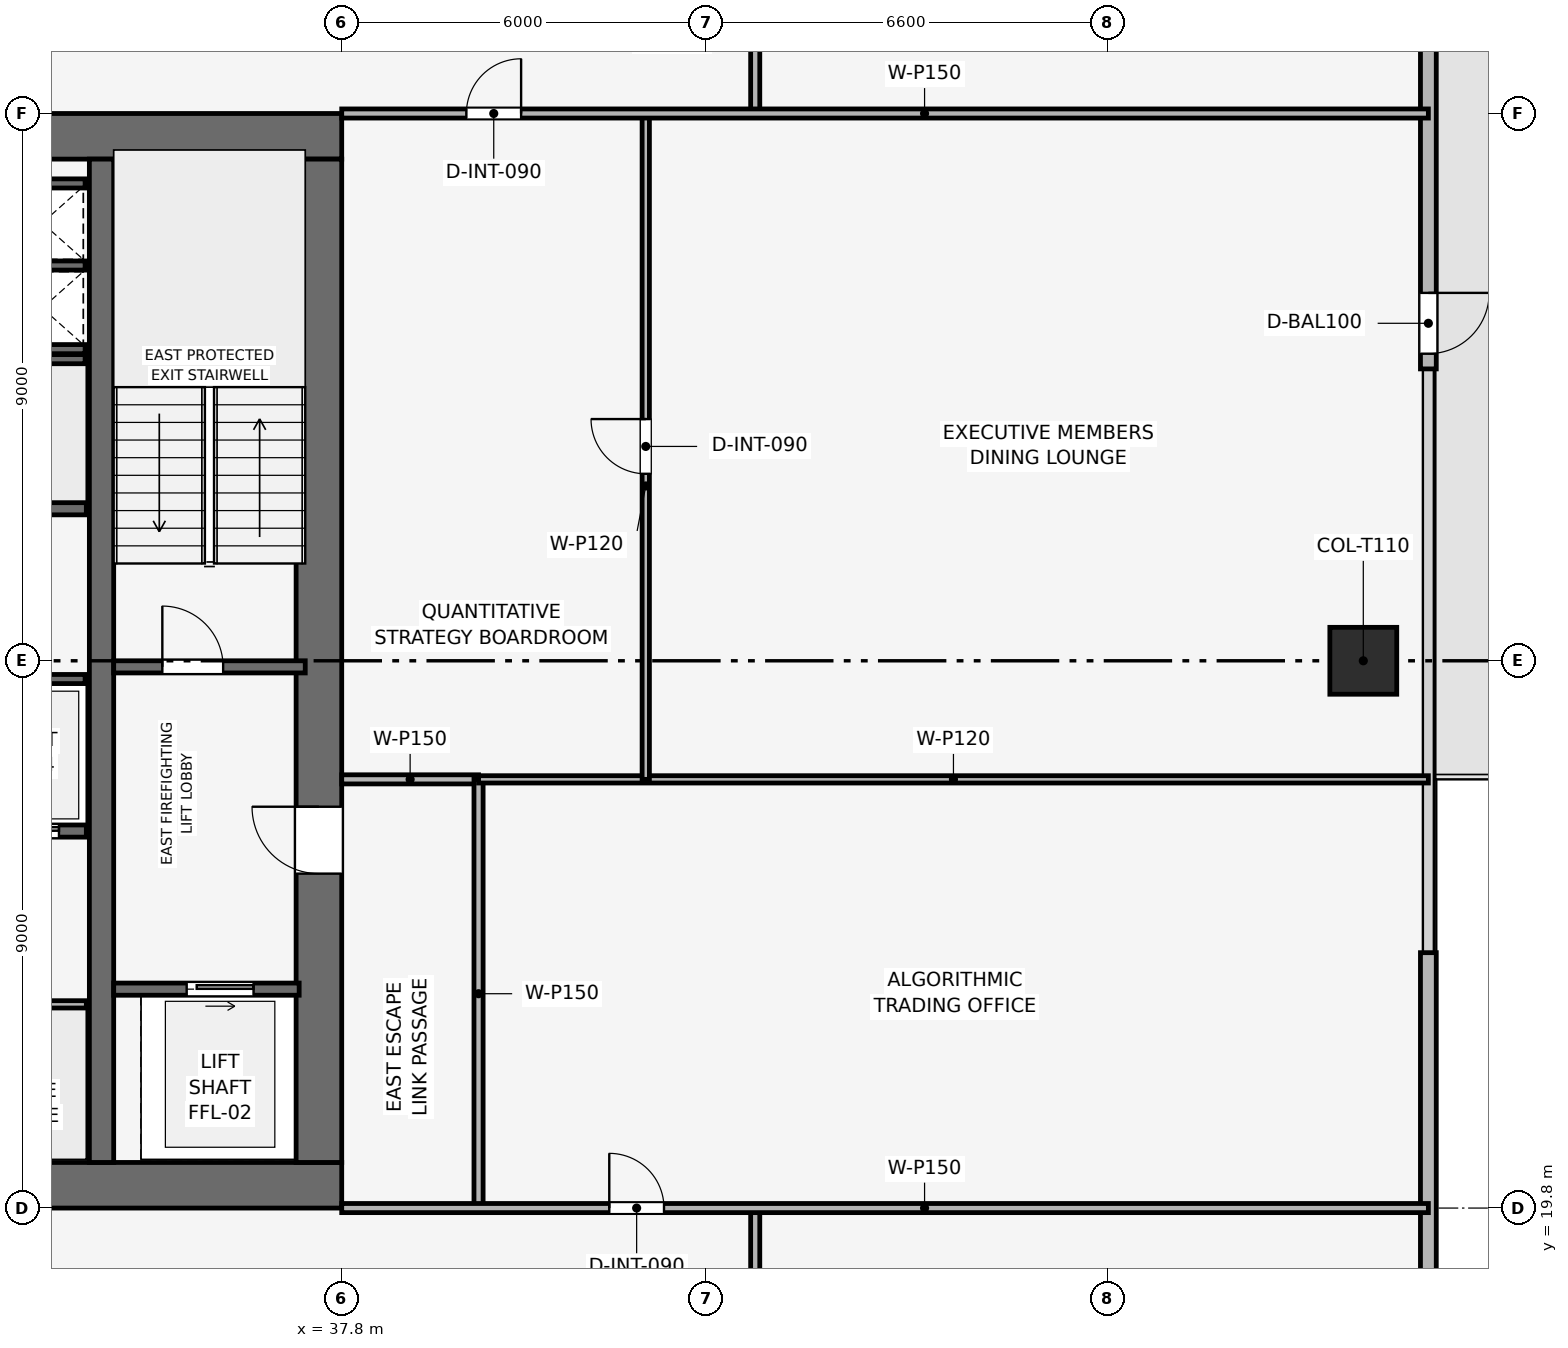
"""IFC4 building model, lengths in metres.
Left out: names, types, materials, properties, quantities, classifications, styles, units other than length and angle.
Written with IfcOpenShell. Run it as: python <this file> out.ifc"""

import sys

from ifc_helpers import new_model, si_unit, direction, frame, frame_2d, origin, origin_2d, place, context, subcontext, project, spatial, rectangle, extrude, element, fill, save


model = new_model("IFC4")
c1 = context("Model", 3, precision=1e-05, world=origin(), true_north=direction((0.0, 1.0)))
c2 = subcontext(c1, "Body", "Model", "MODEL_VIEW")
j1 = project(units=[si_unit("LENGTHUNIT", "METRE"), si_unit("PLANEANGLEUNIT", "RADIAN")], contexts=[c1])
p1 = place(None, origin())
s1 = spatial("IfcSite", under=j1, at=p1, CompositionType="ELEMENT")
p2 = place(p1, origin())
s2 = spatial("IfcBuilding", under=s1, at=p2, CompositionType="ELEMENT")
p3 = place(p2, frame((0.0, 0.0, 226.2)))
s3 = spatial("IfcBuildingStorey", under=s2, at=p3, CompositionType="ELEMENT", Elevation=226.2)
p4 = place(p3, frame((19.8, 20.175, 0.0), z_axis=(0.0, 0.0, 1.0), x_axis=(1.0, 0.0, 0.0)))
e1 = element("IfcWall", 1, at=p4, inside=s3, PredefinedType="SHEAR", context=c2, shape_type="SweptSolid", body=[
    extrude(rectangle(XDim=18.0, YDim=0.75, at=frame_2d((9.0, 0.0))), origin(), (0.0, 0.0, 1.0), 3.75),
])
p5 = place(p4, frame((8.4, 0.0, 0.0)))
e2 = element("IfcOpeningElement", 2, at=p5, cuts=e1, PredefinedType="OPENING", context=c2, shape_type="SweptSolid", body=[
    extrude(rectangle(XDim=1.2, YDim=2.2, at=frame_2d((0.6, 1.1))), frame((0.0, 0.385, 0.0), z_axis=(0.0, -1.0, 0.0), x_axis=(1.0, 0.0, 0.0)), (0.0, 0.0, 1.0), 0.77),
])
p6 = place(p3, frame((19.8, 37.425, 0.0), z_axis=(0.0, 0.0, 1.0), x_axis=(1.0, 0.0, 0.0)))
e3 = element("IfcWall", 3, at=p6, inside=s3, PredefinedType="SHEAR", context=c2, shape_type="SweptSolid", body=[
    extrude(rectangle(XDim=18.0, YDim=0.75, at=frame_2d((9.0, 0.0))), origin(), (0.0, 0.0, 1.0), 3.75),
])
p7 = place(p6, frame((7.05, 0.0, 0.0)))
e4 = element("IfcOpeningElement", 4, at=p7, cuts=e3, PredefinedType="OPENING", context=c2, shape_type="SweptSolid", body=[
    extrude(rectangle(XDim=1.1, YDim=2.15, at=frame_2d((0.55, 1.075))), frame((0.0, 0.385, 0.0), z_axis=(0.0, -1.0, 0.0), x_axis=(1.0, 0.0, 0.0)), (0.0, 0.0, 1.0), 0.77),
])
p8 = place(p3, frame((37.425, 20.55, 0.0), z_axis=(0.0, 0.0, 1.0), x_axis=(0.0, 1.0, 0.0)))
e5 = element("IfcWall", 5, at=p8, inside=s3, PredefinedType="SHEAR", context=c2, shape_type="SweptSolid", body=[
    extrude(rectangle(XDim=16.5, YDim=0.75, at=frame_2d((8.25, 0.0))), origin(), (0.0, 0.0, 1.0), 3.75),
])
p9 = place(p8, frame((4.75, 0.0, 0.0)))
e6 = element("IfcOpeningElement", 6, at=p9, cuts=e5, PredefinedType="OPENING", context=c2, shape_type="SweptSolid", body=[
    extrude(rectangle(XDim=1.1, YDim=2.15, at=frame_2d((0.55, 1.075))), frame((0.0, 0.385, 0.0), z_axis=(0.0, -1.0, 0.0), x_axis=(1.0, 0.0, 0.0)), (0.0, 0.0, 1.0), 0.77),
])
p10 = place(p3, frame((33.85, 20.55, 0.0), z_axis=(0.0, 0.0, 1.0), x_axis=(0.0, 1.0, 0.0)))
e7 = element("IfcWall", 7, at=p10, inside=s3, PredefinedType="SHEAR", context=c2, shape_type="SweptSolid", body=[
    extrude(rectangle(XDim=16.5, YDim=0.4, at=frame_2d((8.25, 0.0))), origin(), (0.0, 0.0, 1.0), 3.75),
])
p11 = place(p3, frame((54.6, 28.8, 0.003), z_axis=(0.0, 0.0, 1.0), x_axis=(1.0, 0.0, 0.0)))
e8 = element("IfcColumn", 8, at=p11, inside=s3, PredefinedType="COLUMN", context=c2, shape_type="SweptSolid", body=[
    extrude(rectangle(XDim=1.1, YDim=1.1, at=origin_2d()), origin(), (0.0, 0.0, 1.0), 3.494),
])
p12 = place(p3, frame((55.67, 48.3, 0.0), z_axis=(0.0, 0.0, 1.0), x_axis=(0.0, -1.0, 0.0)))
e9 = element("IfcWall", 9, at=p12, inside=s3, PredefinedType="SOLIDWALL", context=c2, shape_type="SweptSolid", body=[
    extrude(rectangle(XDim=14.7, YDim=0.26, at=frame_2d((7.35, 0.0))), origin(), (0.0, 0.0, 1.0), 3.5),
])
p13 = place(p12, frame((13.45, 0.0, 0.0)))
e10 = element("IfcOpeningElement", 10, at=p13, cuts=e9, PredefinedType="OPENING", context=c2, shape_type="SweptSolid", body=[
    extrude(rectangle(XDim=1.0, YDim=2.2, at=frame_2d((0.5, 1.1))), frame((0.0, 0.14, 0.0), z_axis=(0.0, -1.0, 0.0), x_axis=(1.0, 0.0, 0.0)), (0.0, 0.0, 1.0), 0.28),
])
p14 = place(p3, frame((55.67, 24.0, 0.0), z_axis=(0.0, 0.0, 1.0), x_axis=(0.0, -1.0, 0.0)))
e11 = element("IfcWall", 11, at=p14, inside=s3, PredefinedType="SOLIDWALL", context=c2, shape_type="SweptSolid", body=[
    extrude(rectangle(XDim=14.7, YDim=0.26, at=frame_2d((7.35, 0.0))), origin(), (0.0, 0.0, 1.0), 3.5),
])
p15 = place(p14, frame((10.65, 0.0, 0.9)))
e12 = element("IfcOpeningElement", 12, at=p15, cuts=e11, PredefinedType="OPENING", context=c2, shape_type="SweptSolid", body=[
    extrude(rectangle(XDim=3.8, YDim=1.9, at=frame_2d((1.9, 0.95))), frame((0.0, 0.14, 0.0), z_axis=(0.0, -1.0, 0.0), x_axis=(1.0, 0.0, 0.0)), (0.0, 0.0, 1.0), 0.28),
])
p16 = place(p3, frame((34.05, 28.7, 0.0), z_axis=(0.0, 0.0, 1.0), x_axis=(1.0, 0.0, 0.0)))
e13 = element("IfcWall", 13, at=p16, inside=s3, PredefinedType="SHEAR", context=c2, shape_type="SweptSolid", body=[
    extrude(rectangle(XDim=3.15, YDim=0.2, at=frame_2d((1.575, 0.0))), origin(), (0.0, 0.0, 1.0), 3.5),
])
p17 = place(p16, frame((0.8, 0.0, 0.0)))
e14 = element("IfcOpeningElement", 14, at=p17, cuts=e13, PredefinedType="OPENING", context=c2, shape_type="SweptSolid", body=[
    extrude(rectangle(XDim=1.0, YDim=2.1, at=frame_2d((0.5, 1.05))), frame((0.0, 0.11, 0.0), z_axis=(0.0, -1.0, 0.0), x_axis=(1.0, 0.0, 0.0)), (0.0, 0.0, 1.0), 0.22),
])
for number, where, z_axis, x_axis in (
    (15, (32.25, 33.925, 0.0), (0.0, 0.0, 1.0), (1.0, 0.0, 0.0)),
    (16, (32.25, 35.3, 0.0), (0.0, 0.0, 1.0), (1.0, 0.0, 0.0)),
):
    element("IfcWall", number, at=place(p3, frame(where, z_axis=z_axis, x_axis=x_axis)), inside=s3, PredefinedType="SHEAR", context=c2, shape_type="SweptSolid", body=[
        extrude(rectangle(XDim=1.33, YDim=0.15, at=frame_2d((0.665, 0.0))), origin(), (0.0, 0.0, 1.0), 3.5),
    ])
p18 = place(p3, frame((34.05, 23.4, 0.0), z_axis=(0.0, 0.0, 1.0), x_axis=(1.0, 0.0, 0.0)))
e17 = element("IfcWall", 17, at=p18, inside=s3, PredefinedType="SHEAR", context=c2, shape_type="SweptSolid", body=[
    extrude(rectangle(XDim=3.05, YDim=0.2, at=frame_2d((1.525, 0.0))), origin(), (0.0, 0.0, 1.0), 3.5),
])
p19 = place(p18, frame((1.2, 0.0, 0.0)))
e18 = element("IfcOpeningElement", 18, at=p19, cuts=e17, PredefinedType="OPENING", context=c2, shape_type="SweptSolid", body=[
    extrude(rectangle(XDim=1.1, YDim=2.15, at=frame_2d((0.55, 1.075))), frame((0.0, 0.11, 0.0), z_axis=(0.0, -1.0, 0.0), x_axis=(1.0, 0.0, 0.0)), (0.0, 0.0, 1.0), 0.22),
])
p20 = place(p3, frame((31.6, 26.0, 0.0), z_axis=(0.0, 0.0, 1.0), x_axis=(1.0, 0.0, 0.0)))
e19 = element("IfcWall", 19, at=p20, inside=s3, PredefinedType="SHEAR", context=c2, shape_type="SweptSolid", body=[
    extrude(rectangle(XDim=2.0, YDim=0.2, at=frame_2d((1.0, 0.0))), origin(), (0.0, 0.0, 1.0), 3.5),
])
p21 = place(p20, frame((0.45, 0.0, 0.0)))
e20 = element("IfcOpeningElement", 20, at=p21, cuts=e19, PredefinedType="OPENING", context=c2, shape_type="SweptSolid", body=[
    extrude(rectangle(XDim=1.1, YDim=2.15, at=frame_2d((0.55, 1.075))), frame((0.0, 0.11, 0.0), z_axis=(0.0, -1.0, 0.0), x_axis=(1.0, 0.0, 0.0)), (0.0, 0.0, 1.0), 0.22),
])
p22 = place(p3, frame((31.6, 31.3, 0.0), z_axis=(0.0, 0.0, 1.0), x_axis=(1.0, 0.0, 0.0)))
e21 = element("IfcWall", 21, at=p22, inside=s3, PredefinedType="SHEAR", context=c2, shape_type="SweptSolid", body=[
    extrude(rectangle(XDim=2.0, YDim=0.2, at=frame_2d((1.0, 0.0))), origin(), (0.0, 0.0, 1.0), 3.5),
])
p23 = place(p3, frame((32.25, 36.65, 0.0), z_axis=(0.0, 0.0, 1.0), x_axis=(1.0, 0.0, 0.0)))
e22 = element("IfcWall", 22, at=p23, inside=s3, PredefinedType="SHEAR", context=c2, shape_type="SweptSolid", body=[
    extrude(rectangle(XDim=1.33, YDim=0.15, at=frame_2d((0.665, 0.0))), origin(), (0.0, 0.0, 1.0), 3.5),
])
for number, where, z_axis, x_axis in (
    (23, (29.5, 28.5, 0.0), (0.0, 0.0, 1.0), (1.0, 0.0, 0.0)),
    (24, (29.5, 33.76, 0.0), (0.0, 0.0, 1.0), (1.0, 0.0, 0.0)),
):
    element("IfcWall", number, at=place(p3, frame(where, z_axis=z_axis, x_axis=x_axis)), inside=s3, PredefinedType="SHEAR", context=c2, shape_type="SweptSolid", body=[
        extrude(rectangle(XDim=4.08, YDim=0.15, at=frame_2d((2.04, 0.0))), origin(), (0.0, 0.0, 1.0), 3.5),
    ])
p24 = place(p3, frame((29.55, 23.15, 0.0), z_axis=(0.0, 0.0, 1.0), x_axis=(1.0, 0.0, 0.0)))
e25 = element("IfcWall", 25, at=p24, inside=s3, PredefinedType="PARTITIONING", context=c2, shape_type="SweptSolid", body=[
    extrude(rectangle(XDim=4.05, YDim=0.12, at=frame_2d((2.025, 0.0))), origin(), (0.0, 0.0, 1.0), 3.5),
])
p25 = place(p24, frame((1.575, 0.0, 0.0)))
e26 = element("IfcOpeningElement", 26, at=p25, cuts=e25, PredefinedType="OPENING", context=c2, shape_type="SweptSolid", body=[
    extrude(rectangle(XDim=0.9, YDim=2.1, at=frame_2d((0.45, 1.05))), frame((0.0, 0.07, 0.0), z_axis=(0.0, -1.0, 0.0), x_axis=(1.0, 0.0, 0.0)), (0.0, 0.0, 1.0), 0.14),
])
p26 = place(p3, frame((37.8, 26.85, 0.0), z_axis=(0.0, 0.0, 1.0), x_axis=(1.0, 0.0, 0.0)))
e27 = element("IfcWall", 27, at=p26, inside=s3, PredefinedType="PARTITIONING", context=c2, shape_type="SweptSolid", body=[
    extrude(rectangle(XDim=2.25, YDim=0.15, at=frame_2d((1.125, 0.0))), origin(), (0.0, 0.0, 1.0), 3.5),
])
p27 = place(p3, frame((40.05, 19.8, 0.0), z_axis=(0.0, 0.0, 1.0), x_axis=(0.0, 1.0, 0.0)))
e28 = element("IfcWall", 28, at=p27, inside=s3, PredefinedType="PARTITIONING", context=c2, shape_type="SweptSolid", body=[
    extrude(rectangle(XDim=7.05, YDim=0.15, at=frame_2d((3.525, 0.0))), origin(), (0.0, 0.0, 1.0), 3.035),
])
p28 = place(p3, frame((40.05, 26.85, 0.0), z_axis=(0.0, 0.0, 1.0), x_axis=(1.0, 0.0, 0.0)))
e29 = element("IfcWall", 29, at=p28, inside=s3, PredefinedType="PARTITIONING", context=c2, shape_type="SweptSolid", body=[
    extrude(rectangle(XDim=15.62, YDim=0.12, at=frame_2d((7.81, 0.0))), origin(), (0.0, 0.0, 1.0), 2.885),
])
p29 = place(p3, frame((42.8, 26.85, 0.0), z_axis=(0.0, 0.0, 1.0), x_axis=(0.0, 1.0, 0.0)))
e30 = element("IfcWall", 30, at=p29, inside=s3, PredefinedType="PARTITIONING", context=c2, shape_type="SweptSolid", body=[
    extrude(rectangle(XDim=10.95, YDim=0.12, at=frame_2d((5.475, 0.0))), origin(), (0.0, 0.0, 1.0), 3.035),
])
p30 = place(p29, frame((5.025, 0.0, 0.0)))
e31 = element("IfcOpeningElement", 31, at=p30, cuts=e30, PredefinedType="OPENING", context=c2, shape_type="SweptSolid", body=[
    extrude(rectangle(XDim=0.9, YDim=2.1, at=frame_2d((0.45, 1.05))), frame((0.0, 0.07, 0.0), z_axis=(0.0, -1.0, 0.0), x_axis=(1.0, 0.0, 0.0)), (0.0, 0.0, 1.0), 0.14),
])
p31 = place(p3, frame((44.6, 17.4, 0.0), z_axis=(0.0, 0.0, 1.0), x_axis=(0.0, 1.0, 0.0)))
e32 = element("IfcWall", 32, at=p31, inside=s3, PredefinedType="PARTITIONING", context=c2, shape_type="SweptSolid", body=[
    extrude(rectangle(XDim=2.4, YDim=0.15, at=frame_2d((1.2, 0.0))), origin(), (0.0, 0.0, 1.0), 3.5),
])
p32 = place(p3, frame((44.6, 37.8, 0.0), z_axis=(0.0, 0.0, 1.0), x_axis=(0.0, 1.0, 0.0)))
e33 = element("IfcWall", 33, at=p32, inside=s3, PredefinedType="PARTITIONING", context=c2, shape_type="SweptSolid", body=[
    extrude(rectangle(XDim=2.4, YDim=0.15, at=frame_2d((1.2, 0.0))), origin(), (0.0, 0.0, 1.0), 3.5),
])
p33 = place(p3, frame((37.8, 19.8, 0.0), z_axis=(0.0, 0.0, 1.0), x_axis=(1.0, 0.0, 0.0)))
e34 = element("IfcWall", 34, at=p33, inside=s3, PredefinedType="PARTITIONING", context=c2, shape_type="SweptSolid", body=[
    extrude(rectangle(XDim=17.87, YDim=0.15, at=frame_2d((8.935, 0.0))), origin(), (0.0, 0.0, 1.0), 2.885),
])
p34 = place(p33, frame((4.4, 0.0, 0.0)))
e35 = element("IfcOpeningElement", 35, at=p34, cuts=e34, PredefinedType="OPENING", context=c2, shape_type="SweptSolid", body=[
    extrude(rectangle(XDim=0.9, YDim=2.1, at=frame_2d((0.45, 1.05))), frame((0.0, 0.085, 0.0), z_axis=(0.0, -1.0, 0.0), x_axis=(1.0, 0.0, 0.0)), (0.0, 0.0, 1.0), 0.17),
])
p35 = place(p3, frame((37.8, 37.8, 0.0), z_axis=(0.0, 0.0, 1.0), x_axis=(1.0, 0.0, 0.0)))
e36 = element("IfcWall", 36, at=p35, inside=s3, PredefinedType="PARTITIONING", context=c2, shape_type="SweptSolid", body=[
    extrude(rectangle(XDim=17.87, YDim=0.15, at=frame_2d((8.935, 0.0))), origin(), (0.0, 0.0, 1.0), 2.885),
])
p36 = place(p35, frame((2.05, 0.0, 0.0)))
e37 = element("IfcOpeningElement", 37, at=p36, cuts=e36, PredefinedType="OPENING", context=c2, shape_type="SweptSolid", body=[
    extrude(rectangle(XDim=0.9, YDim=2.1, at=frame_2d((0.45, 1.05))), frame((0.0, 0.085, 0.0), z_axis=(0.0, -1.0, 0.0), x_axis=(1.0, 0.0, 0.0)), (0.0, 0.0, 1.0), 0.17),
])
p37 = place(p13, origin())
e38 = element("IfcDoor", 38, at=p37, inside=s3, OperationType="SINGLE_SWING_LEFT", PredefinedType="DOOR", context=c2, shape_type="SweptSolid", body=[
    extrude(rectangle(XDim=1.0, YDim=2.2, at=frame_2d((0.5, 1.1))), frame((0.0, 0.025, 0.0), z_axis=(0.0, -1.0, 0.0), x_axis=(1.0, 0.0, 0.0)), (0.0, 0.0, 1.0), 0.05),
])
fill(e10, e38)
p38 = place(p17, origin())
e39 = element("IfcDoor", 39, at=p38, inside=s3, OperationType="SINGLE_SWING_LEFT", PredefinedType="DOOR", context=c2, shape_type="SweptSolid", body=[
    extrude(rectangle(XDim=1.0, YDim=2.1, at=frame_2d((0.5, 1.05))), frame((0.0, 0.025, 0.0), z_axis=(0.0, -1.0, 0.0), x_axis=(1.0, 0.0, 0.0)), (0.0, 0.0, 1.0), 0.05),
])
fill(e14, e39)
p39 = place(p19, origin())
e40 = element("IfcDoor", 40, at=p39, inside=s3, OperationType="SLIDING_TO_RIGHT", PredefinedType="DOOR", context=c2, shape_type="SweptSolid", body=[
    extrude(rectangle(XDim=1.1, YDim=2.15, at=frame_2d((0.55, 1.075))), frame((0.0, 0.025, 0.0), z_axis=(0.0, -1.0, 0.0), x_axis=(1.0, 0.0, 0.0)), (0.0, 0.0, 1.0), 0.05),
])
fill(e18, e40)
p40 = place(p21, origin())
e41 = element("IfcDoor", 41, at=p40, inside=s3, OperationType="SLIDING_TO_RIGHT", PredefinedType="DOOR", context=c2, shape_type="SweptSolid", body=[
    extrude(rectangle(XDim=1.1, YDim=2.15, at=frame_2d((0.55, 1.075))), frame((0.0, 0.025, 0.0), z_axis=(0.0, -1.0, 0.0), x_axis=(1.0, 0.0, 0.0)), (0.0, 0.0, 1.0), 0.05),
])
fill(e20, e41)
p41 = place(p30, origin())
e42 = element("IfcDoor", 42, at=p41, inside=s3, OperationType="SINGLE_SWING_RIGHT", PredefinedType="DOOR", context=c2, shape_type="SweptSolid", body=[
    extrude(rectangle(XDim=0.9, YDim=2.1, at=frame_2d((0.45, 1.05))), frame((0.0, 0.025, 0.0), z_axis=(0.0, -1.0, 0.0), x_axis=(1.0, 0.0, 0.0)), (0.0, 0.0, 1.0), 0.05),
])
fill(e31, e42)
p42 = place(p34, origin())
e43 = element("IfcDoor", 43, at=p42, inside=s3, OperationType="SINGLE_SWING_LEFT", PredefinedType="DOOR", context=c2, shape_type="SweptSolid", body=[
    extrude(rectangle(XDim=0.9, YDim=2.1, at=frame_2d((0.45, 1.05))), frame((0.0, 0.025, 0.0), z_axis=(0.0, -1.0, 0.0), x_axis=(1.0, 0.0, 0.0)), (0.0, 0.0, 1.0), 0.05),
])
fill(e35, e43)
p43 = place(p36, origin())
e44 = element("IfcDoor", 44, at=p43, inside=s3, OperationType="SINGLE_SWING_RIGHT", PredefinedType="DOOR", context=c2, shape_type="SweptSolid", body=[
    extrude(rectangle(XDim=0.9, YDim=2.1, at=frame_2d((0.45, 1.05))), frame((0.0, 0.025, 0.0), z_axis=(0.0, -1.0, 0.0), x_axis=(1.0, 0.0, 0.0)), (0.0, 0.0, 1.0), 0.05),
])
fill(e37, e44)
p44 = place(p9, origin())
e45 = element("IfcDoor", 45, at=p44, inside=s3, OperationType="SINGLE_SWING_RIGHT", PredefinedType="DOOR", context=c2, shape_type="SweptSolid", body=[
    extrude(rectangle(XDim=1.1, YDim=2.15, at=frame_2d((0.55, 1.075))), frame((0.0, 0.025, 0.0), z_axis=(0.0, -1.0, 0.0), x_axis=(1.0, 0.0, 0.0)), (0.0, 0.0, 1.0), 0.05),
])
fill(e6, e45)
save(model, sys.argv[1])
